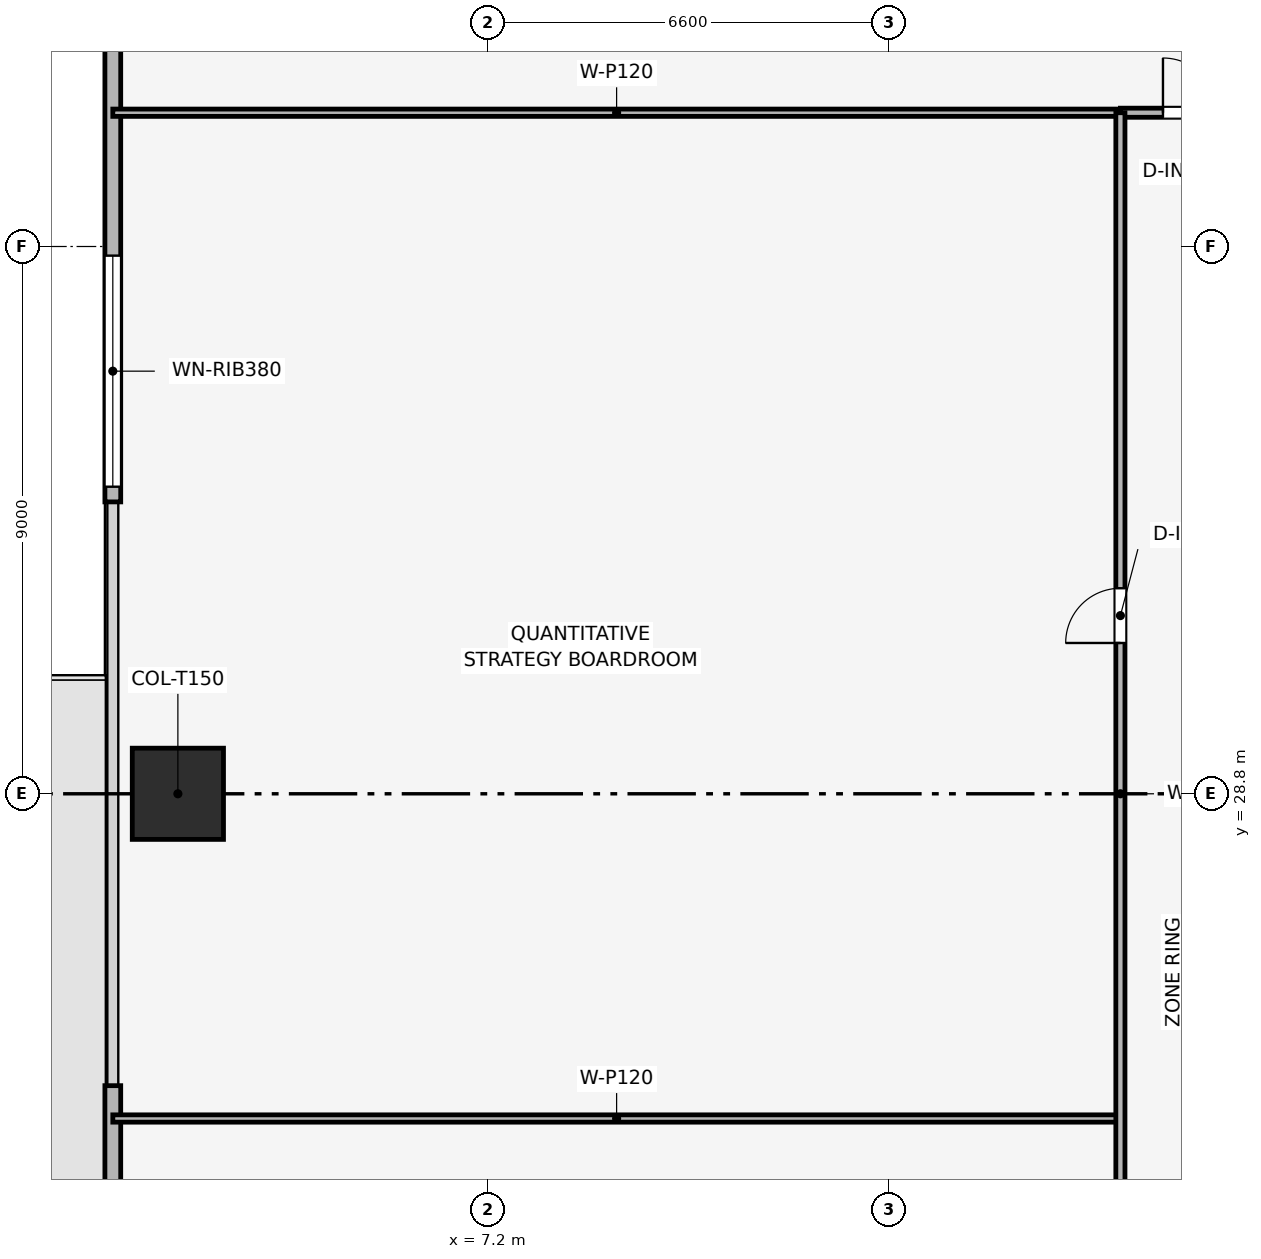
"""IFC4 building model, lengths in metres.
Left out: names, types, materials, properties, quantities, classifications, styles, units other than length and angle.
Written with IfcOpenShell. Run it as: python <this file> out.ifc"""

import sys

from ifc_helpers import new_model, si_unit, direction, frame, frame_2d, origin, origin_2d, place, context, subcontext, project, spatial, rectangle, extrude, element, fill, save


model = new_model("IFC4")
c1 = context("Model", 3, precision=1e-05, world=origin(), true_north=direction((0.0, 1.0)))
c2 = subcontext(c1, "Body", "Model", "MODEL_VIEW")
j1 = project(units=[si_unit("LENGTHUNIT", "METRE"), si_unit("PLANEANGLEUNIT", "RADIAN")], contexts=[c1])
p1 = place(None, origin())
s1 = spatial("IfcSite", under=j1, at=p1, CompositionType="ELEMENT")
p2 = place(p1, origin())
s2 = spatial("IfcBuilding", under=s1, at=p2, CompositionType="ELEMENT")
p3 = place(p2, frame((0.0, 0.0, 61.2)))
s3 = spatial("IfcBuildingStorey", under=s2, at=p3, CompositionType="ELEMENT", Elevation=61.2)
p4 = place(p3, frame((2.1, 28.8, 0.003), z_axis=(0.0, 0.0, 1.0), x_axis=(1.0, 0.0, 0.0)))
e1 = element("IfcColumn", 1, at=p4, inside=s3, PredefinedType="COLUMN", context=c2, shape_type="SweptSolid", body=[
    extrude(rectangle(XDim=1.5, YDim=1.5, at=origin_2d()), origin(), (0.0, 0.0, 1.0), 3.644),
])
p5 = place(p3, frame((1.03, 8.7, 0.0), z_axis=(0.0, 0.0, 1.0), x_axis=(0.0, 1.0, 0.0)))
e2 = element("IfcWall", 2, at=p5, inside=s3, PredefinedType="SOLIDWALL", context=c2, shape_type="SweptSolid", body=[
    extrude(rectangle(XDim=15.3, YDim=0.26, at=frame_2d((7.65, 0.0))), origin(), (0.0, 0.0, 1.0), 3.65),
])
p6 = place(p5, frame((11.319, 0.0, 0.0)))
e3 = element("IfcOpeningElement", 3, at=p6, cuts=e2, PredefinedType="OPENING", context=c2, shape_type="SweptSolid", body=[
    extrude(rectangle(XDim=1.1, YDim=2.2, at=frame_2d((0.55, 1.1))), frame((0.0, 0.14, 0.0), z_axis=(0.0, -1.0, 0.0), x_axis=(1.0, 0.0, 0.0)), (0.0, 0.0, 1.0), 0.28),
])
p7 = place(p3, frame((1.03, 33.6, 0.0), z_axis=(0.0, 0.0, 1.0), x_axis=(0.0, 1.0, 0.0)))
e4 = element("IfcWall", 4, at=p7, inside=s3, PredefinedType="SOLIDWALL", context=c2, shape_type="SweptSolid", body=[
    extrude(rectangle(XDim=15.3, YDim=0.26, at=frame_2d((7.65, 0.0))), origin(), (0.0, 0.0, 1.0), 3.65),
])
p8 = place(p7, frame((0.25, 0.0, 0.9)))
e5 = element("IfcOpeningElement", 5, at=p8, cuts=e4, PredefinedType="OPENING", context=c2, shape_type="SweptSolid", body=[
    extrude(rectangle(XDim=3.8, YDim=1.9, at=frame_2d((1.9, 0.95))), frame((0.0, 0.14, 0.0), z_axis=(0.0, -1.0, 0.0), x_axis=(1.0, 0.0, 0.0)), (0.0, 0.0, 1.0), 0.28),
])
for number, where, z_axis, x_axis in (
    (6, (1.03, 40.0, 0.0), (0.0, 0.0, 1.0), (1.0, 0.0, 0.0)),
    (7, (1.03, 23.46, 0.0), (0.0, 0.0, 1.0), (1.0, 0.0, 0.0)),
):
    element("IfcWall", number, at=place(p3, frame(where, z_axis=z_axis, x_axis=x_axis)), inside=s3, PredefinedType="PARTITIONING", context=c2, shape_type="SweptSolid", body=[
        extrude(rectangle(XDim=16.57, YDim=0.12, at=frame_2d((8.285, 0.0))), origin(), (0.0, 0.0, 1.0), 2.935),
    ])
p9 = place(p3, frame((17.6, 40.0, 0.0), z_axis=(0.0, 0.0, 1.0), x_axis=(1.0, 0.0, 0.0)))
e8 = element("IfcWall", 8, at=p9, inside=s3, PredefinedType="PARTITIONING", context=c2, shape_type="SweptSolid", body=[
    extrude(rectangle(XDim=22.4, YDim=0.15, at=frame_2d((11.2, 0.0))), origin(), (0.0, 0.0, 1.0), 3.085),
])
p10 = place(p9, frame((0.7, 0.0, 0.0)))
e9 = element("IfcOpeningElement", 9, at=p10, cuts=e8, PredefinedType="OPENING", context=c2, shape_type="SweptSolid", body=[
    extrude(rectangle(XDim=0.9, YDim=2.1, at=frame_2d((0.45, 1.05))), frame((0.0, 0.085, 0.0), z_axis=(0.0, -1.0, 0.0), x_axis=(1.0, 0.0, 0.0)), (0.0, 0.0, 1.0), 0.17),
])
p11 = place(p9, frame((4.888, 0.0, 0.0)))
e10 = element("IfcOpeningElement", 10, at=p11, cuts=e8, PredefinedType="OPENING", context=c2, shape_type="SweptSolid", body=[
    extrude(rectangle(XDim=0.9, YDim=2.1, at=frame_2d((0.45, 1.05))), frame((0.0, 0.085, 0.0), z_axis=(0.0, -1.0, 0.0), x_axis=(1.0, 0.0, 0.0)), (0.0, 0.0, 1.0), 0.17),
])
p12 = place(p9, frame((10.808, 0.0, 0.0)))
e11 = element("IfcOpeningElement", 11, at=p12, cuts=e8, PredefinedType="OPENING", context=c2, shape_type="SweptSolid", body=[
    extrude(rectangle(XDim=0.9, YDim=2.1, at=frame_2d((0.45, 1.05))), frame((0.0, 0.085, 0.0), z_axis=(0.0, -1.0, 0.0), x_axis=(1.0, 0.0, 0.0)), (0.0, 0.0, 1.0), 0.17),
])
p13 = place(p9, frame((17.82, 0.0, 0.0)))
e12 = element("IfcOpeningElement", 12, at=p13, cuts=e8, PredefinedType="OPENING", context=c2, shape_type="SweptSolid", body=[
    extrude(rectangle(XDim=0.9, YDim=2.1, at=frame_2d((0.45, 1.05))), frame((0.0, 0.085, 0.0), z_axis=(0.0, -1.0, 0.0), x_axis=(1.0, 0.0, 0.0)), (0.0, 0.0, 1.0), 0.17),
])
p14 = place(p3, frame((17.6, 17.6, 0.0), z_axis=(0.0, 0.0, 1.0), x_axis=(0.0, 1.0, 0.0)))
e13 = element("IfcWall", 13, at=p14, inside=s3, PredefinedType="PARTITIONING", context=c2, shape_type="SweptSolid", body=[
    extrude(rectangle(XDim=22.4, YDim=0.15, at=frame_2d((11.2, 0.0))), origin(), (0.0, 0.0, 1.0), 3.085),
])
p15 = place(p14, frame((2.48, 0.0, 0.0)))
e14 = element("IfcOpeningElement", 14, at=p15, cuts=e13, PredefinedType="OPENING", context=c2, shape_type="SweptSolid", body=[
    extrude(rectangle(XDim=0.9, YDim=2.1, at=frame_2d((0.45, 1.05))), frame((0.0, 0.085, 0.0), z_axis=(0.0, -1.0, 0.0), x_axis=(1.0, 0.0, 0.0)), (0.0, 0.0, 1.0), 0.17),
])
p16 = place(p14, frame((13.68, 0.0, 0.0)))
e15 = element("IfcOpeningElement", 15, at=p16, cuts=e13, PredefinedType="OPENING", context=c2, shape_type="SweptSolid", body=[
    extrude(rectangle(XDim=0.9, YDim=2.1, at=frame_2d((0.45, 1.05))), frame((0.0, 0.085, 0.0), z_axis=(0.0, -1.0, 0.0), x_axis=(1.0, 0.0, 0.0)), (0.0, 0.0, 1.0), 0.17),
])
p17 = place(p8, origin())
e16 = element("IfcWindow", 16, at=p17, inside=s3, PartitioningType="SINGLE_PANEL", PredefinedType="WINDOW", context=c2, shape_type="SweptSolid", body=[
    extrude(rectangle(XDim=3.8, YDim=1.9, at=frame_2d((1.9, 0.95))), frame((0.0, 0.03, 0.0), z_axis=(0.0, -1.0, 0.0), x_axis=(1.0, 0.0, 0.0)), (0.0, 0.0, 1.0), 0.06),
])
fill(e5, e16)
p18 = place(p10, origin())
e17 = element("IfcDoor", 17, at=p18, inside=s3, OperationType="SINGLE_SWING_LEFT", PredefinedType="DOOR", context=c2, shape_type="SweptSolid", body=[
    extrude(rectangle(XDim=0.9, YDim=2.1, at=frame_2d((0.45, 1.05))), frame((0.0, 0.025, 0.0), z_axis=(0.0, -1.0, 0.0), x_axis=(1.0, 0.0, 0.0)), (0.0, 0.0, 1.0), 0.05),
])
fill(e9, e17)
p19 = place(p16, origin())
e18 = element("IfcDoor", 18, at=p19, inside=s3, OperationType="SINGLE_SWING_LEFT", PredefinedType="DOOR", context=c2, shape_type="SweptSolid", body=[
    extrude(rectangle(XDim=0.9, YDim=2.1, at=frame_2d((0.45, 1.05))), frame((0.0, 0.025, 0.0), z_axis=(0.0, -1.0, 0.0), x_axis=(1.0, 0.0, 0.0)), (0.0, 0.0, 1.0), 0.05),
])
fill(e15, e18)
save(model, sys.argv[1])
